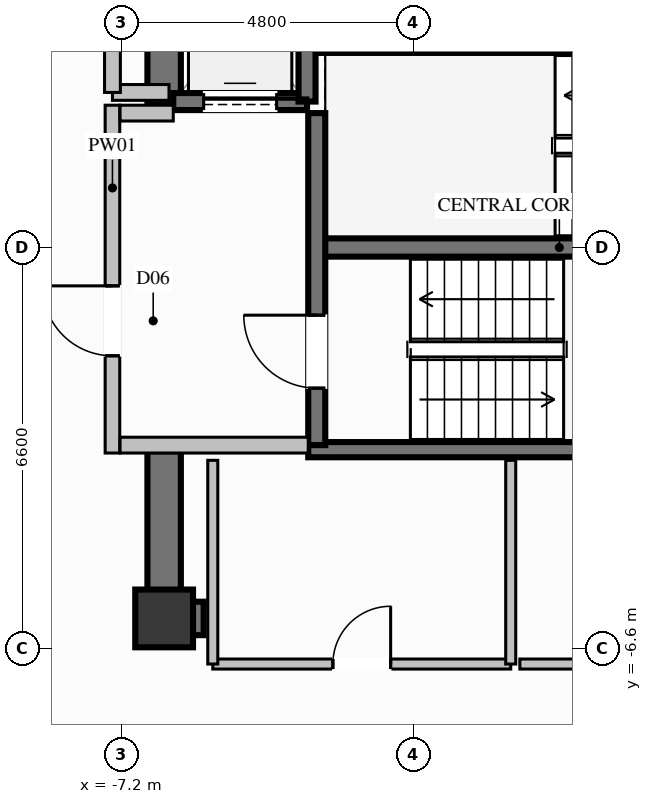
"""IFC4 building model, lengths in metres.
Left out: names, types, materials, properties, quantities, classifications, styles, units other than length and angle.
Written with IfcOpenShell. Run it as: python <this file> out.ifc"""

import sys

from ifc_helpers import new_model, si_unit, direction, frame, frame_2d, origin, origin_2d, place, context, subcontext, project, spatial, rectangle, extrude, element, fill, save


model = new_model("IFC4")
c1 = context("Model", 3, precision=1e-05, world=origin(), true_north=direction((0.0, 1.0)))
c2 = subcontext(c1, "Body", "Model", "MODEL_VIEW")
j1 = project(units=[si_unit("LENGTHUNIT", "METRE"), si_unit("PLANEANGLEUNIT", "RADIAN")], contexts=[c1])
p1 = place(None, origin())
s1 = spatial("IfcSite", under=j1, at=p1, CompositionType="ELEMENT")
p2 = place(p1, origin())
s2 = spatial("IfcBuilding", under=s1, at=p2, CompositionType="ELEMENT")
p3 = place(p2, frame((0.0, 0.0, 191.2)))
s3 = spatial("IfcBuildingStorey", under=s2, at=p3, CompositionType="ELEMENT", Elevation=191.2)
p4 = place(p3, frame((-6.5, -6.1, 0.0), z_axis=(0.0, 0.0, 1.0), x_axis=(1.0, 0.0, 0.0)))
e1 = element("IfcColumn", 1, at=p4, inside=s3, PredefinedType="COLUMN", context=c2, shape_type="SweptSolid", body=[
    extrude(rectangle(XDim=0.95, YDim=0.95, at=origin_2d()), origin(), (0.0, 0.0, 1.0), 3.6),
])
p5 = place(p3, frame((-3.99, 0.0, 0.0), z_axis=(0.0, 0.0, 1.0), x_axis=(1.0, 0.0, 0.0)))
e2 = element("IfcWall", 2, at=p5, inside=s3, PredefinedType="SHEAR", context=c2, shape_type="SweptSolid", body=[
    extrude(rectangle(XDim=7.98, YDim=0.3, at=frame_2d((3.99, 0.0))), origin(), (0.0, 0.0, 1.0), 3.6),
])
for number, where, z_axis, x_axis in (
    (3, (-4.13, -3.325, 0.0), (0.0, 0.0, 1.0), (1.0, 0.0, 0.0)),
    (4, (-4.13, 3.325, 0.0), (0.0, 0.0, 1.0), (1.0, 0.0, 0.0)),
):
    element("IfcWall", number, at=place(p3, frame(where, z_axis=z_axis, x_axis=x_axis)), inside=s3, PredefinedType="SOLIDWALL", context=c2, shape_type="SweptSolid", body=[
        extrude(rectangle(XDim=8.26, YDim=0.25, at=frame_2d((4.13, 0.0))), origin(), (0.0, 0.0, 1.0), 3.6),
    ])
p6 = place(p3, frame((-6.225, -6.1, 0.0), z_axis=(0.0, 0.0, 1.0), x_axis=(1.0, 0.0, 0.0)))
e5 = element("IfcWall", 5, at=p6, inside=s3, PredefinedType="SHEAR", context=c2, shape_type="SweptSolid", body=[
    extrude(rectangle(XDim=0.375, YDim=0.55, at=frame_2d((0.188, 0.0))), origin(), (0.0, 0.0, 1.0), 3.6),
])
p7 = place(p3, frame((-6.5, 2.35, 0.0), z_axis=(0.0, 0.0, 1.0), x_axis=(0.0, 1.0, 0.0)))
e6 = element("IfcWall", 6, at=p7, inside=s3, PredefinedType="SHEAR", context=c2, shape_type="SweptSolid", body=[
    extrude(rectangle(XDim=4.025, YDim=0.55, at=frame_2d((2.012, 0.0))), origin(), (0.0, 0.0, 1.0), 3.6),
])
p8 = place(p3, frame((-6.5, -6.375, 0.0), z_axis=(0.0, 0.0, 1.0), x_axis=(0.0, 1.0, 0.0)))
e7 = element("IfcWall", 7, at=p8, inside=s3, PredefinedType="SHEAR", context=c2, shape_type="SweptSolid", body=[
    extrude(rectangle(XDim=3.025, YDim=0.55, at=frame_2d((1.512, 0.0))), origin(), (0.0, 0.0, 1.0), 3.6),
])
p9 = place(p3, frame((-6.35, 2.4, 0.0), z_axis=(0.0, 0.0, 1.0), x_axis=(1.0, 0.0, 0.0)))
e8 = element("IfcWall", 8, at=p9, inside=s3, PredefinedType="SOLIDWALL", context=c2, shape_type="SweptSolid", body=[
    extrude(rectangle(XDim=2.2, YDim=0.28, at=frame_2d((1.1, 0.0))), origin(), (0.0, 0.0, 1.0), 3.36),
])
p10 = place(p9, frame((0.5, 0.0, 0.0)))
e9 = element("IfcOpeningElement", 9, at=p10, cuts=e8, PredefinedType="OPENING", context=c2, shape_type="SweptSolid", body=[
    extrude(rectangle(XDim=1.2, YDim=2.2, at=frame_2d((0.6, 1.1))), frame((0.0, 0.15, 0.0), z_axis=(0.0, -1.0, 0.0), x_axis=(1.0, 0.0, 0.0)), (0.0, 0.0, 1.0), 0.3),
])
p11 = place(p3, frame((-4.15, 2.4, 0.0), z_axis=(0.0, 0.0, 1.0), x_axis=(0.0, 1.0, 0.0)))
e10 = element("IfcWall", 10, at=p11, inside=s3, PredefinedType="SOLIDWALL", context=c2, shape_type="SweptSolid", body=[
    extrude(rectangle(XDim=2.7, YDim=0.28, at=frame_2d((1.35, 0.0))), origin(), (0.0, 0.0, 1.0), 3.36),
])
p12 = place(p3, frame((-3.99, -3.25, 0.0), z_axis=(0.0, 0.0, 1.0), x_axis=(0.0, 1.0, 0.0)))
e11 = element("IfcWall", 11, at=p12, inside=s3, PredefinedType="SOLIDWALL", context=c2, shape_type="SweptSolid", body=[
    extrude(rectangle(XDim=5.46, YDim=0.28, at=frame_2d((2.73, 0.0))), origin(), (0.0, 0.0, 1.0), 3.36),
])
p13 = place(p12, frame((0.937, 0.0, 0.0)))
e12 = element("IfcOpeningElement", 12, at=p13, cuts=e11, PredefinedType="OPENING", context=c2, shape_type="SweptSolid", body=[
    extrude(rectangle(XDim=1.2, YDim=2.2, at=frame_2d((0.6, 1.1))), frame((0.0, 0.15, 0.0), z_axis=(0.0, -1.0, 0.0), x_axis=(1.0, 0.0, 0.0)), (0.0, 0.0, 1.0), 0.3),
])
p14 = place(p3, frame((-7.35, -3.38, 0.0), z_axis=(0.0, 0.0, 1.0), x_axis=(0.0, 1.0, 0.0)))
e13 = element("IfcWall", 13, at=p14, inside=s3, PredefinedType="PARTITIONING", context=c2, shape_type="SweptSolid", body=[
    extrude(rectangle(XDim=5.72, YDim=0.24, at=frame_2d((2.86, 0.0))), origin(), (0.0, 0.0, 1.0), 2.445),
])
p15 = place(p14, frame((1.599, 0.0, 0.0)))
e14 = element("IfcOpeningElement", 14, at=p15, cuts=e13, PredefinedType="OPENING", context=c2, shape_type="SweptSolid", body=[
    extrude(rectangle(XDim=1.15, YDim=2.2, at=frame_2d((0.575, 1.1))), frame((0.0, 0.13, 0.0), z_axis=(0.0, -1.0, 0.0), x_axis=(1.0, 0.0, 0.0)), (0.0, 0.0, 1.0), 0.26),
])
p16 = place(p3, frame((-7.225, -3.25, 0.0), z_axis=(0.0, 0.0, 1.0), x_axis=(1.0, 0.0, 0.0)))
e15 = element("IfcWall", 15, at=p16, inside=s3, PredefinedType="PARTITIONING", context=c2, shape_type="SweptSolid", body=[
    extrude(rectangle(XDim=3.095, YDim=0.26, at=frame_2d((1.548, 0.0))), origin(), (0.0, 0.0, 1.0), 3.36),
])
p17 = place(p3, frame((-7.225, 2.21, 0.0), z_axis=(0.0, 0.0, 1.0), x_axis=(1.0, 0.0, 0.0)))
e16 = element("IfcWall", 16, at=p17, inside=s3, PredefinedType="PARTITIONING", context=c2, shape_type="SweptSolid", body=[
    extrude(rectangle(XDim=0.875, YDim=0.26, at=frame_2d((0.438, 0.0))), origin(), (0.0, 0.0, 1.0), 3.36),
])
p18 = place(p3, frame((-7.35, 2.55, 0.0), z_axis=(0.0, 0.0, 1.0), x_axis=(1.0, 0.0, 0.0)))
e17 = element("IfcWall", 17, at=p18, inside=s3, PredefinedType="PARTITIONING", context=c2, shape_type="SweptSolid", body=[
    extrude(rectangle(XDim=0.93, YDim=0.26, at=frame_2d((0.465, 0.0))), origin(), (0.0, 0.0, 1.0), 3.36),
])
p19 = place(p3, frame((-7.35, 2.55, 0.0), z_axis=(0.0, 0.0, 1.0), x_axis=(0.0, 1.0, 0.0)))
e18 = element("IfcWall", 18, at=p19, inside=s3, PredefinedType="PARTITIONING", context=c2, shape_type="SweptSolid", body=[
    extrude(rectangle(XDim=2.4, YDim=0.26, at=frame_2d((1.2, 0.0))), origin(), (0.0, 0.0, 1.0), 2.445),
])
p20 = place(p19, frame((0.775, 0.0, 0.0)))
e19 = element("IfcOpeningElement", 19, at=p20, cuts=e18, PredefinedType="OPENING", context=c2, shape_type="SweptSolid", body=[
    extrude(rectangle(XDim=0.85, YDim=2.05, at=frame_2d((0.425, 1.025))), frame((0.0, 0.14, 0.0), z_axis=(0.0, -1.0, 0.0), x_axis=(1.0, 0.0, 0.0)), (0.0, 0.0, 1.0), 0.28),
])
p21 = place(p3, frame((-5.7, -6.85, 0.0), z_axis=(0.0, 0.0, 1.0), x_axis=(1.0, 0.0, 0.0)))
e20 = element("IfcWall", 20, at=p21, inside=s3, PredefinedType="PARTITIONING", context=c2, shape_type="SweptSolid", body=[
    extrude(rectangle(XDim=4.9, YDim=0.165, at=frame_2d((2.45, 0.0))), origin(), (0.0, 0.0, 1.0), 2.445),
])
p22 = place(p21, frame((1.975, 0.0, 0.0)))
e21 = element("IfcOpeningElement", 21, at=p22, cuts=e20, PredefinedType="OPENING", context=c2, shape_type="SweptSolid", body=[
    extrude(rectangle(XDim=0.95, YDim=2.1, at=frame_2d((0.475, 1.05))), frame((0.0, 0.093, 0.0), z_axis=(0.0, -1.0, 0.0), x_axis=(1.0, 0.0, 0.0)), (0.0, 0.0, 1.0), 0.185),
])
p23 = place(p3, frame((-0.8, -6.85, 0.0), z_axis=(0.0, 0.0, 1.0), x_axis=(0.0, 1.0, 0.0)))
e22 = element("IfcWall", 22, at=p23, inside=s3, PredefinedType="PARTITIONING", context=c2, shape_type="SweptSolid", body=[
    extrude(rectangle(XDim=3.35, YDim=0.165, at=frame_2d((1.675, 0.0))), origin(), (0.0, 0.0, 1.0), 3.36),
])
p24 = place(p3, frame((-5.7, -3.5, 0.0), z_axis=(0.0, 0.0, 1.0), x_axis=(0.0, -1.0, 0.0)))
e23 = element("IfcWall", 23, at=p24, inside=s3, PredefinedType="PARTITIONING", context=c2, shape_type="SweptSolid", body=[
    extrude(rectangle(XDim=3.35, YDim=0.165, at=frame_2d((1.675, 0.0))), origin(), (0.0, 0.0, 1.0), 2.445),
])
p25 = place(p3, frame((-0.65, -6.85, 0.0), z_axis=(0.0, 0.0, 1.0), x_axis=(1.0, 0.0, 0.0)))
e24 = element("IfcWall", 24, at=p25, inside=s3, PredefinedType="PARTITIONING", context=c2, shape_type="SweptSolid", body=[
    extrude(rectangle(XDim=4.6, YDim=0.165, at=frame_2d((2.3, 0.0))), origin(), (0.0, 0.0, 1.0), 2.445),
])
p26 = place(p25, frame((1.825, 0.0, 0.0)))
e25 = element("IfcOpeningElement", 25, at=p26, cuts=e24, PredefinedType="OPENING", context=c2, shape_type="SweptSolid", body=[
    extrude(rectangle(XDim=0.95, YDim=2.1, at=frame_2d((0.475, 1.05))), frame((0.0, 0.093, 0.0), z_axis=(0.0, -1.0, 0.0), x_axis=(1.0, 0.0, 0.0)), (0.0, 0.0, 1.0), 0.185),
])
p27 = place(p10, origin())
e26 = element("IfcDoor", 26, at=p27, inside=s3, OperationType="SLIDING_TO_LEFT", PredefinedType="DOOR", context=c2, shape_type="SweptSolid", body=[
    extrude(rectangle(XDim=1.2, YDim=2.2, at=frame_2d((0.6, 1.1))), frame((0.0, 0.025, 0.0), z_axis=(0.0, -1.0, 0.0), x_axis=(1.0, 0.0, 0.0)), (0.0, 0.0, 1.0), 0.05),
])
fill(e9, e26)
p28 = place(p13, origin())
e27 = element("IfcDoor", 27, at=p28, inside=s3, OperationType="SINGLE_SWING_RIGHT", PredefinedType="DOOR", context=c2, shape_type="SweptSolid", body=[
    extrude(rectangle(XDim=1.2, YDim=2.2, at=frame_2d((0.6, 1.1))), frame((0.0, 0.025, 0.0), z_axis=(0.0, -1.0, 0.0), x_axis=(1.0, 0.0, 0.0)), (0.0, 0.0, 1.0), 0.05),
])
fill(e12, e27)
p29 = place(p15, origin())
e28 = element("IfcDoor", 28, at=p29, inside=s3, OperationType="SINGLE_SWING_RIGHT", PredefinedType="DOOR", context=c2, shape_type="SweptSolid", body=[
    extrude(rectangle(XDim=1.15, YDim=2.2, at=frame_2d((0.575, 1.1))), frame((0.0, 0.025, 0.0), z_axis=(0.0, -1.0, 0.0), x_axis=(1.0, 0.0, 0.0)), (0.0, 0.0, 1.0), 0.05),
])
fill(e14, e28)
p30 = place(p22, origin())
e29 = element("IfcDoor", 29, at=p30, inside=s3, OperationType="SINGLE_SWING_RIGHT", PredefinedType="DOOR", context=c2, shape_type="SweptSolid", body=[
    extrude(rectangle(XDim=0.95, YDim=2.1, at=frame_2d((0.475, 1.05))), frame((0.0, 0.025, 0.0), z_axis=(0.0, -1.0, 0.0), x_axis=(1.0, 0.0, 0.0)), (0.0, 0.0, 1.0), 0.05),
])
fill(e21, e29)
save(model, sys.argv[1])
